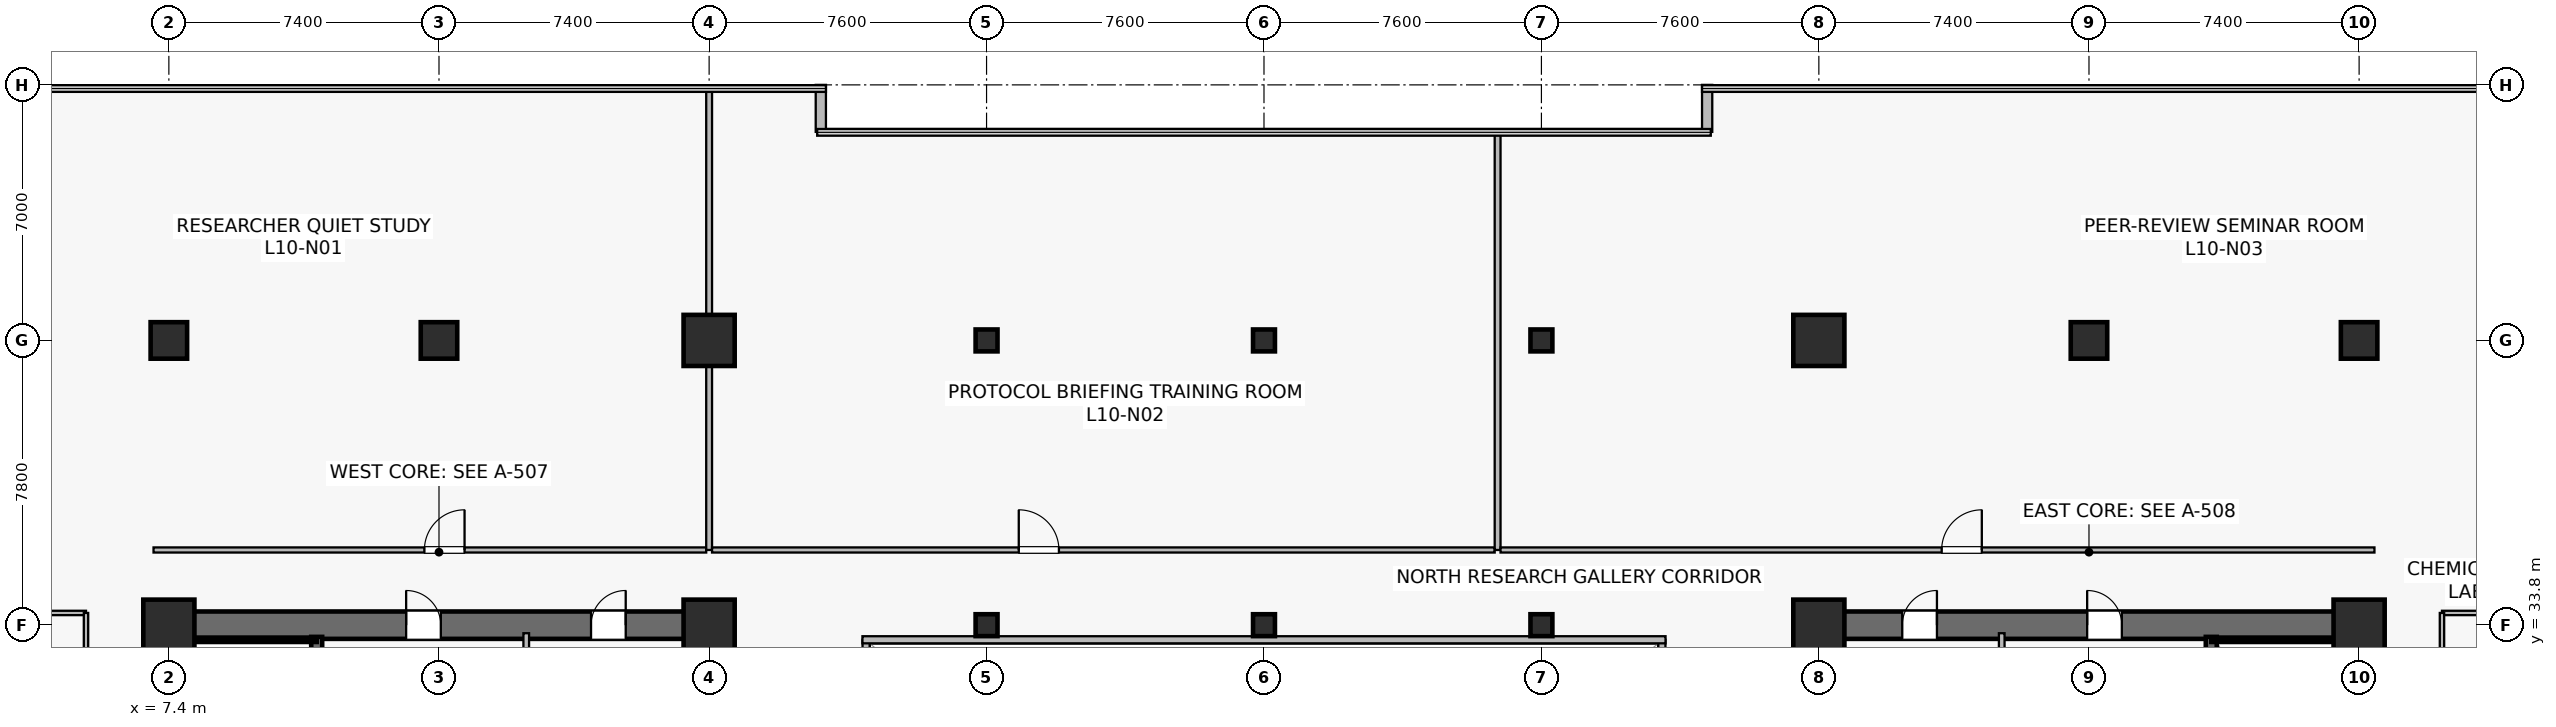
"""IFC4 building model, lengths in metres.
Left out: names, types, materials, properties, quantities, classifications, styles, units other than length and angle.
Written with IfcOpenShell. Run it as: python <this file> out.ifc"""

import sys

from ifc_helpers import new_model, si_unit, direction, frame, frame_2d, origin, origin_2d, place, context, subcontext, project, spatial, rectangle, hollow_rectangle, extrude, source, transform, mapped, element, fill, save


model = new_model("IFC4")
c1 = context("Model", 3, precision=1e-05, world=origin(), true_north=direction((0.0, 1.0)))
c2 = subcontext(c1, "Body", "Model", "MODEL_VIEW")
j1 = project(units=[si_unit("LENGTHUNIT", "METRE"), si_unit("PLANEANGLEUNIT", "RADIAN")], contexts=[c1])
p1 = place(None, origin())
s1 = spatial("IfcSite", under=j1, at=p1, CompositionType="ELEMENT")
p2 = place(p1, origin())
s2 = spatial("IfcBuilding", under=s1, at=p2, CompositionType="ELEMENT")
p3 = place(p2, frame((0.0, 0.0, 41.6)))
s3 = spatial("IfcBuildingStorey", under=s2, at=p3, CompositionType="ELEMENT", Elevation=41.6)
p4 = place(p3, frame((7.025, 33.8, 0.0), z_axis=(0.0, 0.0, 1.0), x_axis=(1.0, 0.0, 0.0)))
e1 = element("IfcWall", 1, at=p4, inside=s3, PredefinedType="SHEAR", context=c2, shape_type="SweptSolid", body=[
    extrude(rectangle(XDim=15.55, YDim=0.75, at=frame_2d((7.775, 0.0))), origin(), (0.0, 0.0, 1.0), 3.78),
])
p5 = place(p4, frame((6.875, 0.0, 0.0)))
e2 = element("IfcOpeningElement", 2, at=p5, cuts=e1, PredefinedType="OPENING", context=c2, shape_type="SweptSolid", body=[
    extrude(rectangle(XDim=0.95, YDim=2.15, at=frame_2d((0.475, 1.075))), frame((0.0, 0.385, 0.0), z_axis=(0.0, -1.0, 0.0), x_axis=(1.0, 0.0, 0.0)), (0.0, 0.0, 1.0), 0.77),
])
p6 = place(p4, frame((11.94, 0.0, 0.0)))
e3 = element("IfcOpeningElement", 3, at=p6, cuts=e1, PredefinedType="OPENING", context=c2, shape_type="SweptSolid", body=[
    extrude(rectangle(XDim=0.95, YDim=2.15, at=frame_2d((0.475, 1.075))), frame((0.0, 0.385, 0.0), z_axis=(0.0, -1.0, 0.0), x_axis=(1.0, 0.0, 0.0)), (0.0, 0.0, 1.0), 0.77),
])
p7 = place(p3, frame((7.4, 15.175, 0.0), z_axis=(0.0, 0.0, 1.0), x_axis=(0.0, 1.0, 0.0)))
e4 = element("IfcWall", 4, at=p7, inside=s3, PredefinedType="SHEAR", context=c2, shape_type="SweptSolid", body=[
    extrude(rectangle(XDim=18.25, YDim=0.75, at=frame_2d((9.125, 0.0))), origin(), (0.0, 0.0, 1.0), 3.78),
])
p8 = place(p3, frame((22.2, 15.175, 0.0), z_axis=(0.0, 0.0, 1.0), x_axis=(0.0, 1.0, 0.0)))
e5 = element("IfcWall", 5, at=p8, inside=s3, PredefinedType="SHEAR", context=c2, shape_type="SweptSolid", body=[
    extrude(rectangle(XDim=18.25, YDim=0.75, at=frame_2d((9.125, 0.0))), origin(), (0.0, 0.0, 1.0), 3.78),
])
p9 = place(p8, frame((3.375, 0.0, 0.0)))
e6 = element("IfcOpeningElement", 6, at=p9, cuts=e5, PredefinedType="OPENING", context=c2, shape_type="SweptSolid", body=[
    extrude(rectangle(XDim=1.42, YDim=2.2, at=frame_2d((0.71, 1.1))), frame((0.0, 0.385, 0.0), z_axis=(0.0, -1.0, 0.0), x_axis=(1.0, 0.0, 0.0)), (0.0, 0.0, 1.0), 0.77),
])
p10 = place(p3, frame((11.45, 24.85, 0.0), z_axis=(0.0, 0.0, 1.0), x_axis=(0.0, 1.0, 0.0)))
e7 = element("IfcWall", 7, at=p10, inside=s3, PredefinedType="SHEAR", context=c2, shape_type="SweptSolid", body=[
    extrude(rectangle(XDim=8.63, YDim=0.3, at=frame_2d((4.315, 0.0))), origin(), (0.0, 0.0, 1.0), 3.78),
])
p11 = place(p10, frame((0.42, 0.0, 0.0)))
e8 = element("IfcOpeningElement", 8, at=p11, cuts=e7, PredefinedType="OPENING", context=c2, shape_type="SweptSolid", body=[
    extrude(rectangle(XDim=1.1, YDim=2.15, at=frame_2d((0.55, 1.075))), frame((0.0, 0.16, 0.0), z_axis=(0.0, -1.0, 0.0), x_axis=(1.0, 0.0, 0.0)), (0.0, 0.0, 1.0), 0.32),
])
p12 = place(p3, frame((7.73, 33.4, 0.0), z_axis=(0.0, 0.0, 1.0), x_axis=(1.0, 0.0, 0.0)))
e9 = element("IfcWall", 9, at=p12, inside=s3, PredefinedType="SOLIDWALL", context=c2, shape_type="SweptSolid", body=[
    extrude(rectangle(XDim=3.72, YDim=0.12, at=frame_2d((1.86, 0.0))), origin(), (0.0, 0.0, 1.0), 3.78),
])
p13 = place(p3, frame((52.225, 33.8, 0.0), z_axis=(0.0, 0.0, 1.0), x_axis=(1.0, 0.0, 0.0)))
e10 = element("IfcWall", 10, at=p13, inside=s3, PredefinedType="SHEAR", context=c2, shape_type="SweptSolid", body=[
    extrude(rectangle(XDim=15.55, YDim=0.75, at=frame_2d((7.775, 0.0))), origin(), (0.0, 0.0, 1.0), 3.78),
])
p14 = place(p13, frame((7.725, 0.0, 0.0)))
e11 = element("IfcOpeningElement", 11, at=p14, cuts=e10, PredefinedType="OPENING", context=c2, shape_type="SweptSolid", body=[
    extrude(rectangle(XDim=0.95, YDim=2.15, at=frame_2d((0.475, 1.075))), frame((0.0, 0.385, 0.0), z_axis=(0.0, -1.0, 0.0), x_axis=(1.0, 0.0, 0.0)), (0.0, 0.0, 1.0), 0.77),
])
p15 = place(p13, frame((2.66, 0.0, 0.0)))
e12 = element("IfcOpeningElement", 12, at=p15, cuts=e10, PredefinedType="OPENING", context=c2, shape_type="SweptSolid", body=[
    extrude(rectangle(XDim=0.95, YDim=2.15, at=frame_2d((0.475, 1.075))), frame((0.0, 0.385, 0.0), z_axis=(0.0, -1.0, 0.0), x_axis=(1.0, 0.0, 0.0)), (0.0, 0.0, 1.0), 0.77),
])
p16 = place(p3, frame((52.6, 15.175, 0.0), z_axis=(0.0, 0.0, 1.0), x_axis=(0.0, 1.0, 0.0)))
e13 = element("IfcWall", 13, at=p16, inside=s3, PredefinedType="SHEAR", context=c2, shape_type="SweptSolid", body=[
    extrude(rectangle(XDim=18.25, YDim=0.75, at=frame_2d((9.125, 0.0))), origin(), (0.0, 0.0, 1.0), 3.78),
])
p17 = place(p16, frame((3.375, 0.0, 0.0)))
e14 = element("IfcOpeningElement", 14, at=p17, cuts=e13, PredefinedType="OPENING", context=c2, shape_type="SweptSolid", body=[
    extrude(rectangle(XDim=1.42, YDim=2.2, at=frame_2d((0.71, 1.1))), frame((0.0, 0.385, 0.0), z_axis=(0.0, -1.0, 0.0), x_axis=(1.0, 0.0, 0.0)), (0.0, 0.0, 1.0), 0.77),
])
p18 = place(p3, frame((67.4, 15.175, 0.0), z_axis=(0.0, 0.0, 1.0), x_axis=(0.0, 1.0, 0.0)))
e15 = element("IfcWall", 15, at=p18, inside=s3, PredefinedType="SHEAR", context=c2, shape_type="SweptSolid", body=[
    extrude(rectangle(XDim=18.25, YDim=0.75, at=frame_2d((9.125, 0.0))), origin(), (0.0, 0.0, 1.0), 3.78),
])
p19 = place(p3, frame((63.35, 24.85, 0.0), z_axis=(0.0, 0.0, 1.0), x_axis=(0.0, 1.0, 0.0)))
e16 = element("IfcWall", 16, at=p19, inside=s3, PredefinedType="SHEAR", context=c2, shape_type="SweptSolid", body=[
    extrude(rectangle(XDim=8.63, YDim=0.3, at=frame_2d((4.315, 0.0))), origin(), (0.0, 0.0, 1.0), 3.78),
])
p20 = place(p19, frame((0.42, 0.0, 0.0)))
e17 = element("IfcOpeningElement", 17, at=p20, cuts=e16, PredefinedType="OPENING", context=c2, shape_type="SweptSolid", body=[
    extrude(rectangle(XDim=1.1, YDim=2.15, at=frame_2d((0.55, 1.075))), frame((0.0, 0.16, 0.0), z_axis=(0.0, -1.0, 0.0), x_axis=(1.0, 0.0, 0.0)), (0.0, 0.0, 1.0), 0.32),
])
p21 = place(p3, frame((63.35, 33.4, 0.0), z_axis=(0.0, 0.0, 1.0), x_axis=(1.0, 0.0, 0.0)))
e18 = element("IfcWall", 18, at=p21, inside=s3, PredefinedType="SOLIDWALL", context=c2, shape_type="SweptSolid", body=[
    extrude(rectangle(XDim=3.72, YDim=0.12, at=frame_2d((1.86, 0.0))), origin(), (0.0, 0.0, 1.0), 3.78),
])
m1 = source(origin(), c2, "Body", "SweptSolid", [
    extrude(rectangle(XDim=1.4, YDim=1.4, at=origin_2d()), origin(), (0.0, 0.0, 1.0), 4.1),
])
for number, where, z_axis, x_axis in (
    (19, (7.4, 33.8, 0.0), (0.0, 0.0, 1.0), (1.0, 0.0, 0.0)),
    (20, (22.2, 33.8, 0.0), (0.0, 0.0, 1.0), (1.0, 0.0, 0.0)),
):
    element("IfcColumn", number, at=place(p3, frame(where, z_axis=z_axis, x_axis=x_axis)), inside=s3, PredefinedType="COLUMN", context=c2, shape_type="MappedRepresentation", body=[
        mapped(m1, transform((0.0, 0.0, 0.0), scale=1.0)),
    ])
m2 = source(origin(), c2, "Body", "SweptSolid", [
    extrude(rectangle(XDim=1.0, YDim=1.0, at=origin_2d()), origin(), (0.0, 0.0, 1.0), 4.1),
])
p22 = place(p3, frame((14.8, 41.6, 0.0), z_axis=(0.0, 0.0, 1.0), x_axis=(1.0, 0.0, 0.0)))
e21 = element("IfcColumn", 21, at=p22, inside=s3, PredefinedType="COLUMN", context=c2, shape_type="MappedRepresentation", body=[
    mapped(m2, transform((0.0, 0.0, 0.0), scale=1.0)),
])
for number, where, z_axis, x_axis in (
    (22, (22.2, 41.6, 0.0), (0.0, 0.0, 1.0), (1.0, 0.0, 0.0)),
    (23, (52.6, 33.8, 0.0), (0.0, 0.0, 1.0), (1.0, 0.0, 0.0)),
    (24, (67.4, 33.8, 0.0), (0.0, 0.0, 1.0), (1.0, 0.0, 0.0)),
    (25, (52.6, 41.6, 0.0), (0.0, 0.0, 1.0), (1.0, 0.0, 0.0)),
):
    element("IfcColumn", number, at=place(p3, frame(where, z_axis=z_axis, x_axis=x_axis)), inside=s3, PredefinedType="COLUMN", context=c2, shape_type="MappedRepresentation", body=[
        mapped(m1, transform((0.0, 0.0, 0.0), scale=1.0)),
    ])
for number, where, z_axis, x_axis in (
    (26, (60.0, 41.6, 0.0), (0.0, 0.0, 1.0), (1.0, 0.0, 0.0)),
    (27, (7.4, 41.6, 0.0), (0.0, 0.0, 1.0), (1.0, 0.0, 0.0)),
    (28, (67.4, 41.6, 0.0), (0.0, 0.0, 1.0), (1.0, 0.0, 0.0)),
):
    element("IfcColumn", number, at=place(p3, frame(where, z_axis=z_axis, x_axis=x_axis)), inside=s3, PredefinedType="COLUMN", context=c2, shape_type="MappedRepresentation", body=[
        mapped(m2, transform((0.0, 0.0, 0.0), scale=1.0)),
    ])
m3 = source(origin(), c2, "Body", "SweptSolid", [
    extrude(hollow_rectangle(XDim=0.6, YDim=0.6, WallThickness=0.028, at=origin_2d()), origin(), (0.0, 0.0, 1.0), 4.1),
])
for number, where, z_axis, x_axis in (
    (29, (29.8, 33.8, 0.0), (0.0, 0.0, 1.0), (1.0, 0.0, 0.0)),
    (30, (29.8, 41.6, 0.0), (0.0, 0.0, 1.0), (1.0, 0.0, 0.0)),
    (31, (37.4, 33.8, 0.0), (0.0, 0.0, 1.0), (1.0, 0.0, 0.0)),
    (32, (37.4, 41.6, 0.0), (0.0, 0.0, 1.0), (1.0, 0.0, 0.0)),
    (33, (45.0, 33.8, 0.0), (0.0, 0.0, 1.0), (1.0, 0.0, 0.0)),
    (34, (45.0, 41.6, 0.0), (0.0, 0.0, 1.0), (1.0, 0.0, 0.0)),
):
    element("IfcColumn", number, at=place(p3, frame(where, z_axis=z_axis, x_axis=x_axis)), inside=s3, PredefinedType="COLUMN", context=c2, shape_type="MappedRepresentation", body=[
        mapped(m3, transform((0.0, 0.0, 0.0), scale=1.0)),
    ])
for number, where, z_axis, x_axis in (
    (35, (49.54, 48.6, 0.0), (0.0, 0.0, 1.0), (0.0, -1.0, 0.0)),
    (36, (25.26, 47.312, 0.0), (0.0, 0.0, 1.0), (0.0, 1.0, 0.0)),
):
    element("IfcWall", number, at=place(p3, frame(where, z_axis=z_axis, x_axis=x_axis)), inside=s3, PredefinedType="STANDARD", context=c2, shape_type="SweptSolid", body=[
        extrude(rectangle(XDim=1.288, YDim=0.28, at=frame_2d((0.644, 0.0))), origin(), (0.0, 0.0, 1.0), 3.78),
    ])
for number, where, z_axis, x_axis in (
    (37, (17.19, 29.65, 0.0), (0.0, 0.0, 1.0), (0.0, 1.0, 0.0)),
    (38, (57.61, 29.65, 0.0), (0.0, 0.0, 1.0), (0.0, 1.0, 0.0)),
):
    element("IfcWall", number, at=place(p3, frame(where, z_axis=z_axis, x_axis=x_axis)), inside=s3, PredefinedType="PLUMBINGWALL", context=c2, shape_type="SweptSolid", body=[
        extrude(rectangle(XDim=3.93, YDim=0.155, at=frame_2d((1.965, 0.0))), origin(), (0.0, 0.0, 1.0), 3.78),
    ])
p23 = place(p3, frame((26.5, 15.2, 0.0), z_axis=(0.0, 0.0, 1.0), x_axis=(0.0, 1.0, 0.0)))
e39 = element("IfcWall", 39, at=p23, inside=s3, PredefinedType="SOLIDWALL", context=c2, shape_type="SweptSolid", body=[
    extrude(rectangle(XDim=18.2, YDim=0.195, at=frame_2d((9.1, 0.0))), origin(), (0.0, 0.0, 1.0), 3.78),
])
p24 = place(p23, frame((1.8, 0.0, 0.9)))
e40 = element("IfcOpeningElement", 40, at=p24, cuts=e39, PredefinedType="OPENING", context=c2, shape_type="SweptSolid", body=[
    extrude(rectangle(XDim=1.5, YDim=1.4, at=frame_2d((0.75, 0.7))), frame((0.0, 0.107, 0.0), z_axis=(0.0, -1.0, 0.0), x_axis=(1.0, 0.0, 0.0)), (0.0, 0.0, 1.0), 0.215),
])
p25 = place(p23, frame((13.2, 0.0, 0.9)))
e41 = element("IfcOpeningElement", 41, at=p25, cuts=e39, PredefinedType="OPENING", context=c2, shape_type="SweptSolid", body=[
    extrude(rectangle(XDim=1.5, YDim=1.4, at=frame_2d((0.75, 0.7))), frame((0.0, 0.107, 0.0), z_axis=(0.0, -1.0, 0.0), x_axis=(1.0, 0.0, 0.0)), (0.0, 0.0, 1.0), 0.215),
])
p26 = place(p3, frame((48.3, 15.2, 0.0), z_axis=(0.0, 0.0, 1.0), x_axis=(0.0, 1.0, 0.0)))
e42 = element("IfcWall", 42, at=p26, inside=s3, PredefinedType="SOLIDWALL", context=c2, shape_type="SweptSolid", body=[
    extrude(rectangle(XDim=18.2, YDim=0.195, at=frame_2d((9.1, 0.0))), origin(), (0.0, 0.0, 1.0), 3.78),
])
p27 = place(p26, frame((1.8, 0.0, 0.9)))
e43 = element("IfcOpeningElement", 43, at=p27, cuts=e42, PredefinedType="OPENING", context=c2, shape_type="SweptSolid", body=[
    extrude(rectangle(XDim=1.5, YDim=1.4, at=frame_2d((0.75, 0.7))), frame((0.0, 0.107, 0.0), z_axis=(0.0, -1.0, 0.0), x_axis=(1.0, 0.0, 0.0)), (0.0, 0.0, 1.0), 0.215),
])
p28 = place(p26, frame((13.2, 0.0, 0.9)))
e44 = element("IfcOpeningElement", 44, at=p28, cuts=e42, PredefinedType="OPENING", context=c2, shape_type="SweptSolid", body=[
    extrude(rectangle(XDim=1.5, YDim=1.4, at=frame_2d((0.75, 0.7))), frame((0.0, 0.107, 0.0), z_axis=(0.0, -1.0, 0.0), x_axis=(1.0, 0.0, 0.0)), (0.0, 0.0, 1.0), 0.215),
])
p29 = place(p3, frame((26.4, 33.4, 0.0), z_axis=(0.0, 0.0, 1.0), x_axis=(1.0, 0.0, 0.0)))
e45 = element("IfcWall", 45, at=p29, inside=s3, PredefinedType="SOLIDWALL", context=c2, shape_type="SweptSolid", body=[
    extrude(rectangle(XDim=22.0, YDim=0.195, at=frame_2d((11.0, 0.0))), origin(), (0.0, 0.0, 1.0), 3.78),
])
p30 = place(p3, frame((6.98, 35.86, 0.0), z_axis=(0.0, 0.0, 1.0), x_axis=(1.0, 0.0, 0.0)))
e46 = element("IfcWall", 46, at=p30, inside=s3, PredefinedType="PARTITIONING", context=c2, shape_type="SweptSolid", body=[
    extrude(rectangle(XDim=15.14, YDim=0.14, at=frame_2d((7.57, 0.0))), origin(), (0.0, 0.0, 1.0), 3.065),
])
p31 = place(p30, frame((7.42, 0.0, 0.0)))
e47 = element("IfcOpeningElement", 47, at=p31, cuts=e46, PredefinedType="OPENING", context=c2, shape_type="SweptSolid", body=[
    extrude(rectangle(XDim=1.1, YDim=2.18, at=frame_2d((0.55, 1.09))), frame((0.0, 0.08, 0.0), z_axis=(0.0, -1.0, 0.0), x_axis=(1.0, 0.0, 0.0)), (0.0, 0.0, 1.0), 0.16),
])
p32 = place(p3, frame((22.2, 35.86, 0.0), z_axis=(0.0, 0.0, 1.0), x_axis=(0.0, 1.0, 0.0)))
e48 = element("IfcWall", 48, at=p32, inside=s3, PredefinedType="PARTITIONING", context=c2, shape_type="SweptSolid", body=[
    extrude(rectangle(XDim=12.63, YDim=0.16, at=frame_2d((6.315, 0.0))), origin(), (0.0, 0.0, 1.0), 3.015),
])
p33 = place(p3, frame((22.28, 35.86, 0.0), z_axis=(0.0, 0.0, 1.0), x_axis=(1.0, 0.0, 0.0)))
e49 = element("IfcWall", 49, at=p33, inside=s3, PredefinedType="PARTITIONING", context=c2, shape_type="SweptSolid", body=[
    extrude(rectangle(XDim=21.44, YDim=0.14, at=frame_2d((10.72, 0.0))), origin(), (0.0, 0.0, 1.0), 3.065),
])
p34 = place(p33, frame((8.402, 0.0, 0.0)))
e50 = element("IfcOpeningElement", 50, at=p34, cuts=e49, PredefinedType="OPENING", context=c2, shape_type="SweptSolid", body=[
    extrude(rectangle(XDim=1.1, YDim=2.18, at=frame_2d((0.55, 1.09))), frame((0.0, 0.08, 0.0), z_axis=(0.0, -1.0, 0.0), x_axis=(1.0, 0.0, 0.0)), (0.0, 0.0, 1.0), 0.16),
])
p35 = place(p3, frame((43.8, 35.86, 0.0), z_axis=(0.0, 0.0, 1.0), x_axis=(0.0, 1.0, 0.0)))
e51 = element("IfcWall", 51, at=p35, inside=s3, PredefinedType="PARTITIONING", context=c2, shape_type="SweptSolid", body=[
    extrude(rectangle(XDim=11.43, YDim=0.16, at=frame_2d((5.715, 0.0))), origin(), (0.0, 0.0, 1.0), 3.015),
])
p36 = place(p3, frame((43.88, 35.86, 0.0), z_axis=(0.0, 0.0, 1.0), x_axis=(1.0, 0.0, 0.0)))
e52 = element("IfcWall", 52, at=p36, inside=s3, PredefinedType="PARTITIONING", context=c2, shape_type="SweptSolid", body=[
    extrude(rectangle(XDim=23.94, YDim=0.14, at=frame_2d((11.97, 0.0))), origin(), (0.0, 0.0, 1.0), 3.065),
])
p37 = place(p36, frame((12.084, 0.0, 0.0)))
e53 = element("IfcOpeningElement", 53, at=p37, cuts=e52, PredefinedType="OPENING", context=c2, shape_type="SweptSolid", body=[
    extrude(rectangle(XDim=1.1, YDim=2.18, at=frame_2d((0.55, 1.09))), frame((0.0, 0.08, 0.0), z_axis=(0.0, -1.0, 0.0), x_axis=(1.0, 0.0, 0.0)), (0.0, 0.0, 1.0), 0.16),
])
p38 = place(p3, frame((0.11, 34.135, 0.0), z_axis=(0.0, 0.0, 1.0), x_axis=(1.0, 0.0, 0.0)))
e54 = element("IfcWall", 54, at=p38, inside=s3, PredefinedType="PARTITIONING", context=c2, shape_type="SweptSolid", body=[
    extrude(rectangle(XDim=5.02, YDim=0.12, at=frame_2d((2.51, 0.0))), origin(), (0.0, 0.0, 1.0), 3.78),
])
p39 = place(p3, frame((5.13, 25.26, 0.0), z_axis=(0.0, 0.0, 1.0), x_axis=(0.0, 1.0, 0.0)))
e55 = element("IfcWall", 55, at=p39, inside=s3, PredefinedType="PARTITIONING", context=c2, shape_type="SweptSolid", body=[
    extrude(rectangle(XDim=8.875, YDim=0.12, at=frame_2d((4.438, 0.0))), origin(), (0.0, 0.0, 1.0), 3.78),
])
p40 = place(p39, frame((3.988, 0.0, 0.0)))
e56 = element("IfcOpeningElement", 56, at=p40, cuts=e55, PredefinedType="OPENING", context=c2, shape_type="SweptSolid", body=[
    extrude(rectangle(XDim=0.9, YDim=2.1, at=frame_2d((0.45, 1.05))), frame((0.0, 0.07, 0.0), z_axis=(0.0, -1.0, 0.0), x_axis=(1.0, 0.0, 0.0)), (0.0, 0.0, 1.0), 0.14),
])
p41 = place(p3, frame((69.67, 34.135, 0.0), z_axis=(0.0, 0.0, 1.0), x_axis=(1.0, 0.0, 0.0)))
e57 = element("IfcWall", 57, at=p41, inside=s3, PredefinedType="PARTITIONING", context=c2, shape_type="SweptSolid", body=[
    extrude(rectangle(XDim=5.02, YDim=0.12, at=frame_2d((2.51, 0.0))), origin(), (0.0, 0.0, 1.0), 3.78),
])
p42 = place(p3, frame((69.67, 28.06, 0.0), z_axis=(0.0, 0.0, 1.0), x_axis=(0.0, 1.0, 0.0)))
e58 = element("IfcWall", 58, at=p42, inside=s3, PredefinedType="PARTITIONING", context=c2, shape_type="SweptSolid", body=[
    extrude(rectangle(XDim=6.075, YDim=0.12, at=frame_2d((3.038, 0.0))), origin(), (0.0, 0.0, 1.0), 3.78),
])
p43 = place(p42, frame((2.587, 0.0, 0.0)))
e59 = element("IfcOpeningElement", 59, at=p43, cuts=e58, PredefinedType="OPENING", context=c2, shape_type="SweptSolid", body=[
    extrude(rectangle(XDim=0.9, YDim=2.1, at=frame_2d((0.45, 1.05))), frame((0.0, 0.07, 0.0), z_axis=(0.0, -1.0, 0.0), x_axis=(1.0, 0.0, 0.0)), (0.0, 0.0, 1.0), 0.14),
])
m4 = source(origin(), c2, "Body", "SweptSolid", [
    extrude(rectangle(XDim=0.95, YDim=2.15, at=frame_2d((0.475, 1.075))), frame((0.0, 0.025, 0.0), z_axis=(0.0, -1.0, 0.0), x_axis=(1.0, 0.0, 0.0)), (0.0, 0.0, 1.0), 0.05),
])
p44 = place(p5, origin())
e60 = element("IfcDoor", 60, at=p44, inside=s3, OperationType="SINGLE_SWING_LEFT", PredefinedType="DOOR", context=c2, shape_type="MappedRepresentation", body=[
    mapped(m4, transform((0.0, 0.0, 0.0), scale=1.0)),
])
fill(e2, e60)
p45 = place(p6, origin())
e61 = element("IfcDoor", 61, at=p45, inside=s3, OperationType="SINGLE_SWING_RIGHT", PredefinedType="DOOR", context=c2, shape_type="MappedRepresentation", body=[
    mapped(m4, transform((0.0, 0.0, 0.0), scale=1.0)),
])
fill(e3, e61)
p46 = place(p14, origin())
e62 = element("IfcDoor", 62, at=p46, inside=s3, OperationType="SINGLE_SWING_LEFT", PredefinedType="DOOR", context=c2, shape_type="MappedRepresentation", body=[
    mapped(m4, transform((0.0, 0.0, 0.0), scale=1.0)),
])
fill(e11, e62)
p47 = place(p15, origin())
e63 = element("IfcDoor", 63, at=p47, inside=s3, OperationType="SINGLE_SWING_RIGHT", PredefinedType="DOOR", context=c2, shape_type="MappedRepresentation", body=[
    mapped(m4, transform((0.0, 0.0, 0.0), scale=1.0)),
])
fill(e12, e63)
m5 = source(origin(), c2, "Body", "SweptSolid", [
    extrude(rectangle(XDim=1.1, YDim=2.18, at=frame_2d((0.55, 1.09))), frame((0.0, 0.025, 0.0), z_axis=(0.0, -1.0, 0.0), x_axis=(1.0, 0.0, 0.0)), (0.0, 0.0, 1.0), 0.05),
])
p48 = place(p31, origin())
e64 = element("IfcDoor", 64, at=p48, inside=s3, OperationType="SINGLE_SWING_RIGHT", PredefinedType="DOOR", context=c2, shape_type="MappedRepresentation", body=[
    mapped(m5, transform((0.0, 0.0, 0.0), scale=1.0)),
])
fill(e47, e64)
p49 = place(p34, origin())
e65 = element("IfcDoor", 65, at=p49, inside=s3, OperationType="SINGLE_SWING_LEFT", PredefinedType="DOOR", context=c2, shape_type="MappedRepresentation", body=[
    mapped(m5, transform((0.0, 0.0, 0.0), scale=1.0)),
])
fill(e50, e65)
p50 = place(p37, origin())
e66 = element("IfcDoor", 66, at=p50, inside=s3, OperationType="SINGLE_SWING_RIGHT", PredefinedType="DOOR", context=c2, shape_type="MappedRepresentation", body=[
    mapped(m5, transform((0.0, 0.0, 0.0), scale=1.0)),
])
fill(e53, e66)
save(model, sys.argv[1])
